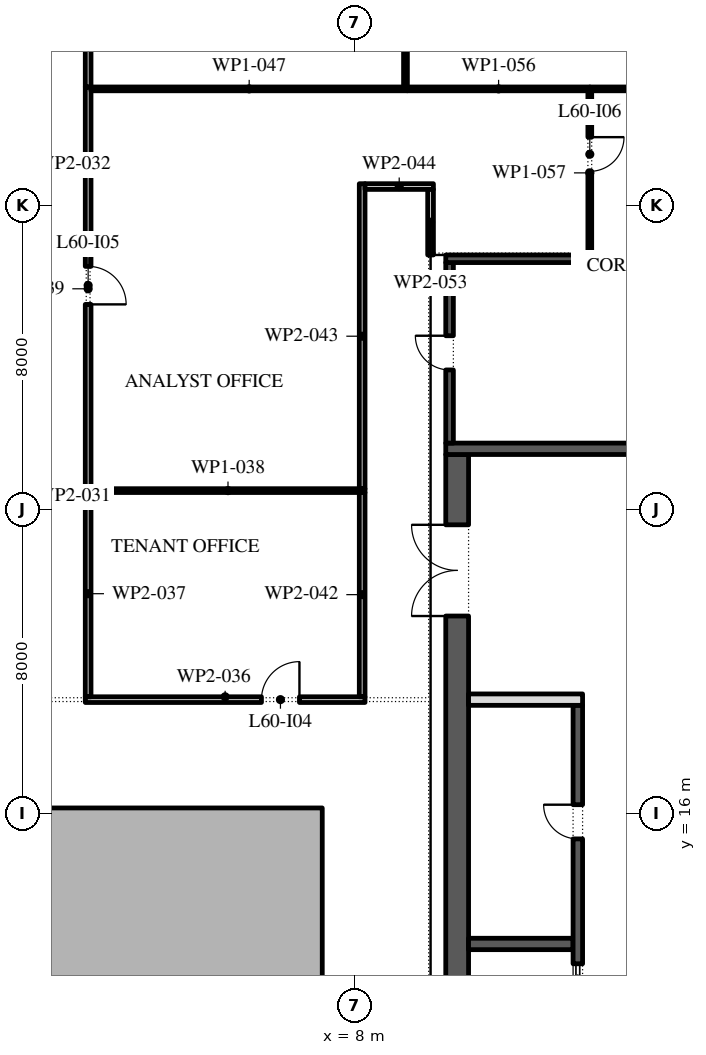
"""IFC4 building model, lengths in metres.
Left out: names, types, materials, properties, quantities, classifications, styles, units other than length and angle.
Written with IfcOpenShell. Run it as: python <this file> out.ifc"""

import sys

from ifc_helpers import new_model, si_unit, direction, frame, frame_2d, origin, place, context, subcontext, project, spatial, polyline, rectangle, outline, extrude, element, fill, save


model = new_model("IFC4")
c1 = context("Model", 3, precision=1e-05, world=origin(), true_north=direction((0.0, 1.0)))
c2 = subcontext(c1, "Body", "Model", "MODEL_VIEW")
j1 = project(units=[si_unit("LENGTHUNIT", "METRE"), si_unit("PLANEANGLEUNIT", "RADIAN")], contexts=[c1])
p1 = place(None, origin())
s1 = spatial("IfcSite", under=j1, at=p1, CompositionType="ELEMENT")
p2 = place(p1, origin())
s2 = spatial("IfcBuilding", under=s1, at=p2, CompositionType="ELEMENT")
p3 = place(p2, frame((0.0, 0.0, 276.6)))
s3 = spatial("IfcBuildingStorey", under=s2, at=p3, CompositionType="ELEMENT", Elevation=276.6)
p4 = place(p3, origin())
e1 = element("IfcWall", 1, at=p4, inside=s3, PredefinedType="STANDARD", context=c2, shape_type="SweptSolid", body=[
    extrude(outline(polyline([(-7.15, -2.15), (7.15, -2.15), (7.15, 16.15), (-7.15, 16.15), (-7.15, -2.15)]), holes=[polyline([(-7.0, -2.0), (-7.0, 16.0), (7.0, 16.0), (7.0, -2.0), (-7.0, -2.0)])]), origin(), (0.0, 0.0, 1.0), 4.0),
])
p5 = place(p3, frame((10.7, -2.45, 0.0), z_axis=(0.0, 0.0, 1.0), x_axis=(0.0, 1.0, 0.0)))
e2 = element("IfcWall", 2, at=p5, inside=s3, PredefinedType="SHEAR", context=c2, shape_type="SweptSolid", body=[
    extrude(rectangle(XDim=27.9, YDim=0.6, at=frame_2d((13.95, 0.0))), origin(), (0.0, 0.0, 1.0), 4.0),
])
p6 = place(p5, frame((23.65, 0.0, 0.0)))
e3 = element("IfcOpeningElement", 3, at=p6, cuts=e2, PredefinedType="OPENING", context=c2, shape_type="SweptSolid", body=[
    extrude(rectangle(XDim=2.4, YDim=2.1, at=frame_2d((1.2, 1.05))), frame((0.0, 0.31, 0.0), z_axis=(0.0, -1.0, 0.0), x_axis=(1.0, 0.0, 0.0)), (0.0, 0.0, 1.0), 0.62),
])
p7 = place(p5, frame((0.788, 0.0, 0.0)))
e4 = element("IfcOpeningElement", 4, at=p7, cuts=e2, PredefinedType="OPENING", context=c2, shape_type="SweptSolid", body=[
    extrude(rectangle(XDim=0.9, YDim=2.1, at=frame_2d((0.45, 1.05))), frame((0.0, 0.31, 0.0), z_axis=(0.0, -1.0, 0.0), x_axis=(1.0, 0.0, 0.0)), (0.0, 0.0, 1.0), 0.62),
])
p8 = place(p5, frame((3.962, 0.0, 0.0)))
e5 = element("IfcOpeningElement", 5, at=p8, cuts=e2, PredefinedType="OPENING", context=c2, shape_type="SweptSolid", body=[
    extrude(rectangle(XDim=1.0, YDim=2.1, at=frame_2d((0.5, 1.05))), frame((0.0, 0.31, 0.0), z_axis=(0.0, -1.0, 0.0), x_axis=(1.0, 0.0, 0.0)), (0.0, 0.0, 1.0), 0.62),
])
p9 = place(p3, frame((10.4, 25.6, 0.0), z_axis=(0.0, 0.0, 1.0), x_axis=(1.0, 0.0, 0.0)))
e6 = element("IfcWall", 6, at=p9, inside=s3, PredefinedType="SHEAR", context=c2, shape_type="SweptSolid", body=[
    extrude(rectangle(XDim=11.2, YDim=0.3, at=frame_2d((5.6, 0.0))), origin(), (0.0, 0.0, 1.0), 4.0),
])
p10 = place(p3, frame((11.0, 12.571, 0.0), z_axis=(0.0, 0.0, 1.0), x_axis=(1.0, 0.0, 0.0)))
e7 = element("IfcWall", 7, at=p10, inside=s3, PredefinedType="SHEAR", context=c2, shape_type="SweptSolid", body=[
    extrude(rectangle(XDim=2.75, YDim=0.3, at=frame_2d((1.375, 0.0))), origin(), (0.0, 0.0, 1.0), 4.0),
])
p11 = place(p3, frame((13.875, -2.45, 0.0), z_axis=(0.0, 0.0, 1.0), x_axis=(0.0, 1.0, 0.0)))
e8 = element("IfcWall", 8, at=p11, inside=s3, PredefinedType="SHEAR", context=c2, shape_type="SweptSolid", body=[
    extrude(rectangle(XDim=21.3, YDim=0.25, at=frame_2d((10.65, 0.0))), origin(), (0.0, 0.0, 1.0), 4.0),
])
p12 = place(p11, frame((17.786, 0.0, 0.0)))
e9 = element("IfcOpeningElement", 9, at=p12, cuts=e8, PredefinedType="OPENING", context=c2, shape_type="SweptSolid", body=[
    extrude(rectangle(XDim=0.9, YDim=2.1, at=frame_2d((0.45, 1.05))), frame((0.0, 0.135, 0.0), z_axis=(0.0, -1.0, 0.0), x_axis=(1.0, 0.0, 0.0)), (0.0, 0.0, 1.0), 0.27),
])
p13 = place(p11, frame((6.971, 0.0, 0.0)))
e10 = element("IfcOpeningElement", 10, at=p13, cuts=e8, PredefinedType="OPENING", context=c2, shape_type="SweptSolid", body=[
    extrude(rectangle(XDim=1.1, YDim=2.1, at=frame_2d((0.55, 1.05))), frame((0.0, 0.135, 0.0), z_axis=(0.0, -1.0, 0.0), x_axis=(1.0, 0.0, 0.0)), (0.0, 0.0, 1.0), 0.27),
])
p14 = place(p11, frame((9.114, 0.0, 0.0)))
e11 = element("IfcOpeningElement", 11, at=p14, cuts=e8, PredefinedType="OPENING", context=c2, shape_type="SweptSolid", body=[
    extrude(rectangle(XDim=1.1, YDim=2.1, at=frame_2d((0.55, 1.05))), frame((0.0, 0.135, 0.0), z_axis=(0.0, -1.0, 0.0), x_axis=(1.0, 0.0, 0.0)), (0.0, 0.0, 1.0), 0.27),
])
p15 = place(p11, frame((11.257, 0.0, 0.0)))
e12 = element("IfcOpeningElement", 12, at=p15, cuts=e8, PredefinedType="OPENING", context=c2, shape_type="SweptSolid", body=[
    extrude(rectangle(XDim=1.1, YDim=2.1, at=frame_2d((0.55, 1.05))), frame((0.0, 0.135, 0.0), z_axis=(0.0, -1.0, 0.0), x_axis=(1.0, 0.0, 0.0)), (0.0, 0.0, 1.0), 0.27),
])
p16 = place(p11, frame((13.4, 0.0, 0.0)))
e13 = element("IfcOpeningElement", 13, at=p16, cuts=e8, PredefinedType="OPENING", context=c2, shape_type="SweptSolid", body=[
    extrude(rectangle(XDim=1.1, YDim=2.1, at=frame_2d((0.55, 1.05))), frame((0.0, 0.135, 0.0), z_axis=(0.0, -1.0, 0.0), x_axis=(1.0, 0.0, 0.0)), (0.0, 0.0, 1.0), 0.27),
])
p17 = place(p3, frame((11.0, 19.0, 0.0), z_axis=(0.0, 0.0, 1.0), x_axis=(1.0, 0.0, 0.0)))
e14 = element("IfcWall", 14, at=p17, inside=s3, PredefinedType="PARTITIONING", context=c2, shape_type="SweptSolid", body=[
    extrude(rectangle(XDim=3.0, YDim=0.3, at=frame_2d((1.5, 0.0))), origin(), (0.0, 0.0, 1.0), 4.0),
])
p18 = place(p3, frame((10.5, 25.75, 0.0), z_axis=(0.0, 0.0, 1.0), x_axis=(0.0, 1.0, 0.0)))
e15 = element("IfcWall", 15, at=p18, inside=s3, PredefinedType="SHEAR", context=c2, shape_type="SweptSolid", body=[
    extrude(rectangle(XDim=4.75, YDim=0.2, at=frame_2d((2.375, 0.0))), origin(), (0.0, 0.0, 1.0), 4.0),
])
p19 = place(p18, frame((1.925, 0.0, 0.0)))
e16 = element("IfcOpeningElement", 16, at=p19, cuts=e15, PredefinedType="OPENING", context=c2, shape_type="SweptSolid", body=[
    extrude(rectangle(XDim=0.9, YDim=2.1, at=frame_2d((0.45, 1.05))), frame((0.0, 0.11, 0.0), z_axis=(0.0, -1.0, 0.0), x_axis=(1.0, 0.0, 0.0)), (0.0, 0.0, 1.0), 0.22),
])
p20 = place(p3, frame((10.4, 30.6, 0.0), z_axis=(0.0, 0.0, 1.0), x_axis=(1.0, 0.0, 0.0)))
e17 = element("IfcWall", 17, at=p20, inside=s3, PredefinedType="SHEAR", context=c2, shape_type="SweptSolid", body=[
    extrude(rectangle(XDim=11.2, YDim=0.2, at=frame_2d((5.6, 0.0))), origin(), (0.0, 0.0, 1.0), 4.0),
])
p21 = place(p3, frame((0.915, 19.0, 0.0), z_axis=(0.0, 0.0, 1.0), x_axis=(1.0, 0.0, 0.0)))
e18 = element("IfcWall", 18, at=p21, inside=s3, PredefinedType="PARTITIONING", context=c2, shape_type="SweptSolid", body=[
    extrude(rectangle(XDim=7.36, YDim=0.15, at=frame_2d((3.68, 0.0))), origin(), (0.0, 0.0, 1.0), 4.0),
])
p22 = place(p21, frame((4.635, 0.0, 0.0)))
e19 = element("IfcOpeningElement", 19, at=p22, cuts=e18, PredefinedType="OPENING", context=c2, shape_type="SweptSolid", body=[
    extrude(rectangle(XDim=1.0, YDim=2.1, at=frame_2d((0.5, 1.05))), frame((0.0, 0.085, 0.0), z_axis=(0.0, -1.0, 0.0), x_axis=(1.0, 0.0, 0.0)), (0.0, 0.0, 1.0), 0.17),
])
p23 = place(p3, frame((0.99, 24.5, 0.0), z_axis=(0.0, 0.0, 1.0), x_axis=(0.0, -1.0, 0.0)))
e20 = element("IfcWall", 20, at=p23, inside=s3, PredefinedType="PARTITIONING", context=c2, shape_type="SweptSolid", body=[
    extrude(rectangle(XDim=5.425, YDim=0.15, at=frame_2d((2.712, 0.0))), origin(), (0.0, 0.0, 1.0), 4.0),
])
p24 = place(p3, frame((1.065, 24.5, 0.0), z_axis=(0.0, 0.0, 1.0), x_axis=(1.0, 0.0, 0.0)))
e21 = element("IfcWall", 21, at=p24, inside=s3, PredefinedType="PARTITIONING", context=c2, shape_type="SweptSolid", body=[
    extrude(rectangle(XDim=7.21, YDim=0.1, at=frame_2d((3.605, 0.0))), origin(), (0.0, 0.0, 1.0), 4.0),
])
p25 = place(p3, frame((0.99, 35.12, 0.0), z_axis=(0.0, 0.0, 1.0), x_axis=(0.0, -1.0, 0.0)))
e22 = element("IfcWall", 22, at=p25, inside=s3, PredefinedType="PARTITIONING", context=c2, shape_type="SweptSolid", body=[
    extrude(rectangle(XDim=10.62, YDim=0.15, at=frame_2d((5.31, 0.0))), origin(), (0.0, 0.0, 1.0), 4.0),
])
p26 = place(p25, frame((4.72, 0.0, 0.0)))
e23 = element("IfcOpeningElement", 23, at=p26, cuts=e22, PredefinedType="OPENING", context=c2, shape_type="SweptSolid", body=[
    extrude(rectangle(XDim=1.0, YDim=2.1, at=frame_2d((0.5, 1.05))), frame((0.0, 0.085, 0.0), z_axis=(0.0, -1.0, 0.0), x_axis=(1.0, 0.0, 0.0)), (0.0, 0.0, 1.0), 0.17),
])
p27 = place(p3, frame((0.99, 41.55, 0.0), z_axis=(0.0, 0.0, 1.0), x_axis=(0.0, -1.0, 0.0)))
e24 = element("IfcWall", 24, at=p27, inside=s3, PredefinedType="PARTITIONING", context=c2, shape_type="SweptSolid", body=[
    extrude(rectangle(XDim=6.43, YDim=0.15, at=frame_2d((3.215, 0.0))), origin(), (0.0, 0.0, 1.0), 4.0),
])
p28 = place(p27, frame((4.08, 0.0, 0.0)))
e25 = element("IfcOpeningElement", 25, at=p28, cuts=e24, PredefinedType="OPENING", context=c2, shape_type="SweptSolid", body=[
    extrude(rectangle(XDim=1.0, YDim=2.1, at=frame_2d((0.5, 1.05))), frame((0.0, 0.085, 0.0), z_axis=(0.0, -1.0, 0.0), x_axis=(1.0, 0.0, 0.0)), (0.0, 0.0, 1.0), 0.17),
])
p29 = place(p3, frame((8.2, 19.075, 0.0), z_axis=(0.0, 0.0, 1.0), x_axis=(0.0, 1.0, 0.0)))
e26 = element("IfcWall", 26, at=p29, inside=s3, PredefinedType="PARTITIONING", context=c2, shape_type="SweptSolid", body=[
    extrude(rectangle(XDim=5.375, YDim=0.15, at=frame_2d((2.688, 0.0))), origin(), (0.0, 0.0, 1.0), 4.0),
])
p30 = place(p3, frame((8.2, 24.55, 0.0), z_axis=(0.0, 0.0, 1.0), x_axis=(0.0, 1.0, 0.0)))
e27 = element("IfcWall", 27, at=p30, inside=s3, PredefinedType="PARTITIONING", context=c2, shape_type="SweptSolid", body=[
    extrude(rectangle(XDim=8.025, YDim=0.15, at=frame_2d((4.012, 0.0))), origin(), (0.0, 0.0, 1.0), 4.0),
])
p31 = place(p3, frame((8.275, 32.5, 0.0), z_axis=(0.0, 0.0, 1.0), x_axis=(1.0, 0.0, 0.0)))
e28 = element("IfcWall", 28, at=p31, inside=s3, PredefinedType="PARTITIONING", context=c2, shape_type="SweptSolid", body=[
    extrude(rectangle(XDim=1.8, YDim=0.15, at=frame_2d((0.9, 0.0))), origin(), (0.0, 0.0, 1.0), 4.0),
])
p32 = place(p3, frame((9.39, 35.07, 0.0), z_axis=(0.0, 0.0, 1.0), x_axis=(-1.0, 0.0, 0.0)))
e29 = element("IfcWall", 29, at=p32, inside=s3, PredefinedType="PARTITIONING", context=c2, shape_type="SweptSolid", body=[
    extrude(rectangle(XDim=8.325, YDim=0.1, at=frame_2d((4.163, 0.0))), origin(), (0.0, 0.0, 1.0), 4.0),
])
p33 = place(p3, frame((9.34, 35.12, 0.0), z_axis=(0.0, 0.0, 1.0), x_axis=(0.0, 1.0, 0.0)))
e30 = element("IfcWall", 30, at=p33, inside=s3, PredefinedType="PARTITIONING", context=c2, shape_type="SweptSolid", body=[
    extrude(rectangle(XDim=6.43, YDim=0.1, at=frame_2d((3.215, 0.0))), origin(), (0.0, 0.0, 1.0), 4.0),
])
p34 = place(p33, frame((3.9, 0.0, 0.0)))
e31 = element("IfcOpeningElement", 31, at=p34, cuts=e30, PredefinedType="OPENING", context=c2, shape_type="SweptSolid", body=[
    extrude(rectangle(XDim=0.9, YDim=2.1, at=frame_2d((0.45, 1.05))), frame((0.0, 0.06, 0.0), z_axis=(0.0, -1.0, 0.0), x_axis=(1.0, 0.0, 0.0)), (0.0, 0.0, 1.0), 0.12),
])
p35 = place(p3, frame((10.0, 32.425, 0.0), z_axis=(0.0, 0.0, 1.0), x_axis=(0.0, -1.0, 0.0)))
e32 = element("IfcWall", 32, at=p35, inside=s3, PredefinedType="PARTITIONING", context=c2, shape_type="SweptSolid", body=[
    extrude(rectangle(XDim=1.725, YDim=0.15, at=frame_2d((0.863, 0.0))), origin(), (0.0, 0.0, 1.0), 4.0),
])
p36 = place(p3, frame((14.19, 35.07, 0.0), z_axis=(0.0, 0.0, 1.0), x_axis=(-1.0, 0.0, 0.0)))
e33 = element("IfcWall", 33, at=p36, inside=s3, PredefinedType="PARTITIONING", context=c2, shape_type="SweptSolid", body=[
    extrude(rectangle(XDim=4.8, YDim=0.1, at=frame_2d((2.4, 0.0))), origin(), (0.0, 0.0, 1.0), 4.0),
])
p37 = place(p3, frame((14.19, 35.02, 0.0), z_axis=(0.0, 0.0, 1.0), x_axis=(0.0, -1.0, 0.0)))
e34 = element("IfcWall", 34, at=p37, inside=s3, PredefinedType="PARTITIONING", context=c2, shape_type="SweptSolid", body=[
    extrude(rectangle(XDim=4.32, YDim=0.1, at=frame_2d((2.16, 0.0))), origin(), (0.0, 0.0, 1.0), 4.0),
])
p38 = place(p37, frame((1.22, 0.0, 0.0)))
e35 = element("IfcOpeningElement", 35, at=p38, cuts=e34, PredefinedType="OPENING", context=c2, shape_type="SweptSolid", body=[
    extrude(rectangle(XDim=0.9, YDim=2.1, at=frame_2d((0.45, 1.05))), frame((0.0, 0.06, 0.0), z_axis=(0.0, -1.0, 0.0), x_axis=(1.0, 0.0, 0.0)), (0.0, 0.0, 1.0), 0.12),
])
p39 = place(p3, frame((21.98, 35.07, 0.0), z_axis=(0.0, 0.0, 1.0), x_axis=(-1.0, 0.0, 0.0)))
e36 = element("IfcWall", 36, at=p39, inside=s3, PredefinedType="PARTITIONING", context=c2, shape_type="SweptSolid", body=[
    extrude(rectangle(XDim=7.79, YDim=0.1, at=frame_2d((3.895, 0.0))), origin(), (0.0, 0.0, 1.0), 4.0),
])
p40 = place(p12, origin())
e37 = element("IfcDoor", 37, at=p40, inside=s3, OperationType="SINGLE_SWING_LEFT", PredefinedType="DOOR", context=c2, shape_type="SweptSolid", body=[
    extrude(rectangle(XDim=0.9, YDim=2.1, at=frame_2d((0.45, 1.05))), frame((0.0, 0.125, 0.0), z_axis=(0.0, -1.0, 0.0), x_axis=(1.0, 0.0, 0.0)), (0.0, 0.0, 1.0), 0.05),
])
fill(e9, e37)
p41 = place(p16, origin())
e38 = element("IfcDoor", 38, at=p41, inside=s3, OperationType="SLIDING_TO_LEFT", PredefinedType="DOOR", context=c2, shape_type="SweptSolid", body=[
    extrude(rectangle(XDim=1.1, YDim=2.1, at=frame_2d((0.55, 1.05))), frame((0.0, 0.025, 0.0), z_axis=(0.0, -1.0, 0.0), x_axis=(1.0, 0.0, 0.0)), (0.0, 0.0, 1.0), 0.05),
])
fill(e13, e38)
p42 = place(p6, origin())
e39 = element("IfcDoor", 39, at=p42, inside=s3, OperationType="DOUBLE_DOOR_SINGLE_SWING", PredefinedType="DOOR", context=c2, shape_type="SweptSolid", body=[
    extrude(rectangle(XDim=2.4, YDim=2.1, at=frame_2d((1.2, 1.05))), frame((0.0, 0.025, 0.0), z_axis=(0.0, -1.0, 0.0), x_axis=(1.0, 0.0, 0.0)), (0.0, 0.0, 1.0), 0.05),
])
fill(e3, e39)
p43 = place(p19, origin())
e40 = element("IfcDoor", 40, at=p43, inside=s3, OperationType="SINGLE_SWING_LEFT", PredefinedType="DOOR", context=c2, shape_type="SweptSolid", body=[
    extrude(rectangle(XDim=0.9, YDim=2.1, at=frame_2d((0.45, 1.05))), frame((0.0, -0.05, 0.0), z_axis=(0.0, -1.0, 0.0), x_axis=(1.0, 0.0, 0.0)), (0.0, 0.0, 1.0), 0.05),
])
fill(e16, e40)
p44 = place(p22, origin())
e41 = element("IfcDoor", 41, at=p44, inside=s3, OperationType="SINGLE_SWING_LEFT", PredefinedType="DOOR", context=c2, shape_type="SweptSolid", body=[
    extrude(rectangle(XDim=1.0, YDim=2.1, at=frame_2d((0.5, 1.05))), frame((0.0, 0.025, 0.0), z_axis=(0.0, -1.0, 0.0), x_axis=(1.0, 0.0, 0.0)), (0.0, 0.0, 1.0), 0.05),
])
fill(e19, e41)
p45 = place(p26, origin())
e42 = element("IfcDoor", 42, at=p45, inside=s3, OperationType="SINGLE_SWING_LEFT", PredefinedType="DOOR", context=c2, shape_type="SweptSolid", body=[
    extrude(rectangle(XDim=1.0, YDim=2.1, at=frame_2d((0.5, 1.05))), frame((0.0, 0.025, 0.0), z_axis=(0.0, -1.0, 0.0), x_axis=(1.0, 0.0, 0.0)), (0.0, 0.0, 1.0), 0.05),
])
fill(e23, e42)
p46 = place(p38, origin())
e43 = element("IfcDoor", 43, at=p46, inside=s3, OperationType="SINGLE_SWING_RIGHT", PredefinedType="DOOR", context=c2, shape_type="SweptSolid", body=[
    extrude(rectangle(XDim=0.9, YDim=2.1, at=frame_2d((0.45, 1.05))), frame((0.0, 0.025, 0.0), z_axis=(0.0, -1.0, 0.0), x_axis=(1.0, 0.0, 0.0)), (0.0, 0.0, 1.0), 0.05),
])
fill(e35, e43)
save(model, sys.argv[1])
